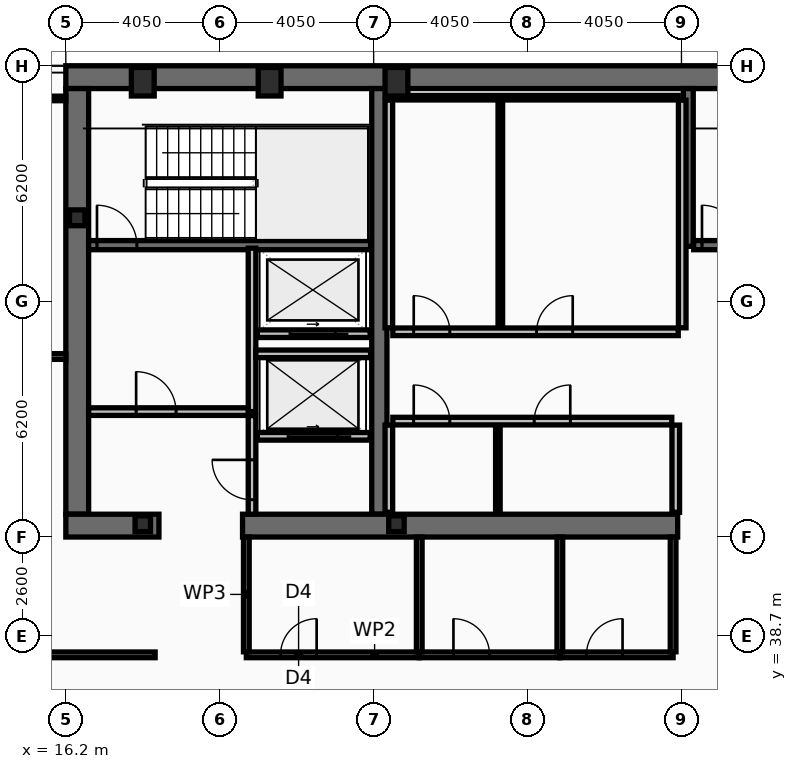
"""IFC4 building model, lengths in metres.
Left out: names, types, materials, properties, quantities, classifications, styles, units other than length and angle.
Written with IfcOpenShell. Run it as: python <this file> out.ifc"""

import sys

from ifc_helpers import new_model, si_unit, direction, frame, frame_2d, origin, origin_2d, place, context, subcontext, project, spatial, rectangle, hollow_rectangle, i_section, extrude, element, fill, save


model = new_model("IFC4")
c1 = context("Model", 3, precision=1e-05, world=origin(), true_north=direction((0.0, 1.0)))
c2 = subcontext(c1, "Body", "Model", "MODEL_VIEW")
j1 = project(units=[si_unit("LENGTHUNIT", "METRE"), si_unit("PLANEANGLEUNIT", "RADIAN")], contexts=[c1])
p1 = place(None, origin())
s1 = spatial("IfcSite", under=j1, at=p1, CompositionType="ELEMENT")
p2 = place(p1, origin())
s2 = spatial("IfcBuilding", under=s1, at=p2, CompositionType="ELEMENT")
p3 = place(p2, frame((0.0, 0.0, 217.4)))
s3 = spatial("IfcBuildingStorey", under=s2, at=p3, CompositionType="ELEMENT", Elevation=217.4)
p4 = place(p3, frame((16.2, 53.4, 0.0), z_axis=(0.0, 0.0, 1.0), x_axis=(1.0, 0.0, 0.0)))
e1 = element("IfcWall", 1, at=p4, inside=s3, PredefinedType="SHEAR", context=c2, shape_type="SweptSolid", body=[
    extrude(rectangle(XDim=40.5, YDim=0.6, at=frame_2d((20.25, 0.0))), origin(), (0.0, 0.0, 1.0), 3.44),
])
p5 = place(p3, frame((16.5, 41.9, 0.0), z_axis=(0.0, 0.0, 1.0), x_axis=(0.0, 1.0, 0.0)))
e2 = element("IfcWall", 2, at=p5, inside=s3, PredefinedType="SHEAR", context=c2, shape_type="SweptSolid", body=[
    extrude(rectangle(XDim=11.2, YDim=0.6, at=frame_2d((5.6, 0.0))), origin(), (0.0, 0.0, 1.0), 3.44),
])
p6 = place(p3, frame((24.45, 41.9, 0.0), z_axis=(0.0, 0.0, 1.0), x_axis=(0.0, 1.0, 0.0)))
e3 = element("IfcWall", 3, at=p6, inside=s3, PredefinedType="SHEAR", context=c2, shape_type="SweptSolid", body=[
    extrude(rectangle(XDim=11.2, YDim=0.4, at=frame_2d((5.6, 0.0))), origin(), (0.0, 0.0, 1.0), 3.44),
])
p7 = place(p3, frame((18.65, 41.6, 0.0), z_axis=(0.0, 0.0, 1.0), x_axis=(-1.0, 0.0, 0.0)))
e4 = element("IfcWall", 4, at=p7, inside=s3, PredefinedType="SHEAR", context=c2, shape_type="SweptSolid", body=[
    extrude(rectangle(XDim=2.45, YDim=0.6, at=frame_2d((1.225, 0.0))), origin(), (0.0, 0.0, 1.0), 3.44),
])
p8 = place(p3, frame((32.3, 41.6, 0.0), z_axis=(0.0, 0.0, 1.0), x_axis=(-1.0, 0.0, 0.0)))
e5 = element("IfcWall", 5, at=p8, inside=s3, PredefinedType="SHEAR", context=c2, shape_type="SweptSolid", body=[
    extrude(rectangle(XDim=11.45, YDim=0.6, at=frame_2d((5.725, 0.0))), origin(), (0.0, 0.0, 1.0), 3.44),
])
p9 = place(p3, frame((32.58, 48.95, 0.0), z_axis=(0.0, 0.0, 1.0), x_axis=(0.0, 1.0, 0.0)))
e6 = element("IfcWall", 6, at=p9, inside=s3, PredefinedType="SHEAR", context=c2, shape_type="SweptSolid", body=[
    extrude(rectangle(XDim=4.15, YDim=0.26, at=frame_2d((2.075, 0.0))), origin(), (0.0, 0.0, 1.0), 3.44),
])
p10 = place(p3, frame((16.8, 48.98, 0.0), z_axis=(0.0, 0.0, 1.0), x_axis=(1.0, 0.0, 0.0)))
e7 = element("IfcWall", 7, at=p10, inside=s3, PredefinedType="SHEAR", context=c2, shape_type="SweptSolid", body=[
    extrude(rectangle(XDim=7.42, YDim=0.24, at=frame_2d((3.71, 0.0))), origin(), (0.0, 0.0, 1.0), 3.44),
])
p11 = place(p10, frame((0.22, 0.0, 0.0)))
e8 = element("IfcOpeningElement", 8, at=p11, cuts=e7, PredefinedType="OPENING", context=c2, shape_type="SweptSolid", body=[
    extrude(rectangle(XDim=1.05, YDim=2.15, at=frame_2d((0.525, 1.075))), frame((0.0, 0.13, 0.0), z_axis=(0.0, -1.0, 0.0), x_axis=(1.0, 0.0, 0.0)), (0.0, 0.0, 1.0), 0.26),
])
p12 = place(p3, frame((32.72, 48.98, 0.0), z_axis=(0.0, 0.0, 1.0), x_axis=(1.0, 0.0, 0.0)))
e9 = element("IfcWall", 9, at=p12, inside=s3, PredefinedType="SHEAR", context=c2, shape_type="SweptSolid", body=[
    extrude(rectangle(XDim=7.56, YDim=0.24, at=frame_2d((3.78, 0.0))), origin(), (0.0, 0.0, 1.0), 3.44),
])
p13 = place(p12, frame((0.22, 0.0, 0.0)))
e10 = element("IfcOpeningElement", 10, at=p13, cuts=e9, PredefinedType="OPENING", context=c2, shape_type="SweptSolid", body=[
    extrude(rectangle(XDim=1.05, YDim=2.15, at=frame_2d((0.525, 1.075))), frame((0.0, 0.13, 0.0), z_axis=(0.0, -1.0, 0.0), x_axis=(1.0, 0.0, 0.0)), (0.0, 0.0, 1.0), 0.26),
])
for number, where, z_axis, x_axis in (
    (11, (18.225, 53.28, 0.0), (0.0, 0.0, 1.0), (1.0, 0.0, 0.0)),
    (12, (21.562, 53.28, 0.0), (0.0, 0.0, 1.0), (1.0, 0.0, 0.0)),
    (13, (24.9, 53.28, 0.0), (0.0, 0.0, 1.0), (1.0, 0.0, 0.0)),
):
    element("IfcColumn", number, at=place(p3, frame(where, z_axis=z_axis, x_axis=x_axis)), inside=s3, PredefinedType="COLUMN", context=c2, shape_type="SweptSolid", body=[
        extrude(hollow_rectangle(XDim=0.6, YDim=0.75, WallThickness=0.045, at=origin_2d()), origin(), (0.0, 0.0, 1.0), 3.6),
    ])
for number, where, z_axis, x_axis in (
    (14, (16.5, 49.7, 0.0), (0.0, 0.0, 1.0), (1.0, 0.0, 0.0)),
    (15, (18.225, 41.65, 0.0), (0.0, 0.0, 1.0), (1.0, 0.0, 0.0)),
    (16, (24.9, 41.65, 0.0), (0.0, 0.0, 1.0), (1.0, 0.0, 0.0)),
):
    element("IfcColumn", number, at=place(p3, frame(where, z_axis=z_axis, x_axis=x_axis)), inside=s3, PredefinedType="COLUMN", context=c2, shape_type="SweptSolid", body=[
        extrude(i_section(OverallWidth=0.406, OverallDepth=0.416, WebThickness=0.03, FlangeThickness=0.048, at=origin_2d()), origin(), (0.0, 0.0, 1.0), 3.6),
    ])
p14 = place(p3, frame((24.21, 43.95, 0.0), z_axis=(0.0, 0.0, 1.0), x_axis=(-1.0, 0.0, 0.0)))
e17 = element("IfcWall", 17, at=p14, inside=s3, PredefinedType="PARTITIONING", context=c2, shape_type="SweptSolid", body=[
    extrude(rectangle(XDim=2.97, YDim=0.2, at=frame_2d((1.485, 0.0))), origin(), (0.0, 0.0, 1.0), 3.44),
])
p15 = place(p14, frame((0.86, 0.0, 0.0)))
e18 = element("IfcOpeningElement", 18, at=p15, cuts=e17, PredefinedType="OPENING", context=c2, shape_type="SweptSolid", body=[
    extrude(rectangle(XDim=1.3, YDim=2.18, at=frame_2d((0.65, 1.09))), frame((0.0, 0.11, 0.0), z_axis=(0.0, -1.0, 0.0), x_axis=(1.0, 0.0, 0.0)), (0.0, 0.0, 1.0), 0.22),
])
p16 = place(p3, frame((24.21, 46.65, 0.0), z_axis=(0.0, 0.0, 1.0), x_axis=(-1.0, 0.0, 0.0)))
e19 = element("IfcWall", 19, at=p16, inside=s3, PredefinedType="PARTITIONING", context=c2, shape_type="SweptSolid", body=[
    extrude(rectangle(XDim=2.97, YDim=0.2, at=frame_2d((1.485, 0.0))), origin(), (0.0, 0.0, 1.0), 3.44),
])
p17 = place(p16, frame((0.91, 0.0, 0.0)))
e20 = element("IfcOpeningElement", 20, at=p17, cuts=e19, PredefinedType="OPENING", context=c2, shape_type="SweptSolid", body=[
    extrude(rectangle(XDim=1.2, YDim=2.18, at=frame_2d((0.6, 1.09))), frame((0.0, 0.11, 0.0), z_axis=(0.0, -1.0, 0.0), x_axis=(1.0, 0.0, 0.0)), (0.0, 0.0, 1.0), 0.22),
])
p18 = place(p3, frame((21.1, 44.6, 0.0), z_axis=(0.0, 0.0, 1.0), x_axis=(0.0, 1.0, 0.0)))
e21 = element("IfcWall", 21, at=p18, inside=s3, PredefinedType="PARTITIONING", context=c2, shape_type="SweptSolid", body=[
    extrude(rectangle(XDim=4.3, YDim=0.2, at=frame_2d((2.15, 0.0))), origin(), (0.0, 0.0, 1.0), 3.44),
])
p19 = place(p3, frame((16.8, 44.6, 0.0), z_axis=(0.0, 0.0, 1.0), x_axis=(1.0, 0.0, 0.0)))
e22 = element("IfcWall", 22, at=p19, inside=s3, PredefinedType="PARTITIONING", context=c2, shape_type="SweptSolid", body=[
    extrude(rectangle(XDim=4.2, YDim=0.2, at=frame_2d((2.1, 0.0))), origin(), (0.0, 0.0, 1.0), 3.44),
])
p20 = place(p19, frame((1.25, 0.0, 0.0)))
e23 = element("IfcOpeningElement", 23, at=p20, cuts=e22, PredefinedType="OPENING", context=c2, shape_type="SweptSolid", body=[
    extrude(rectangle(XDim=1.05, YDim=2.15, at=frame_2d((0.525, 1.075))), frame((0.0, 0.11, 0.0), z_axis=(0.0, -1.0, 0.0), x_axis=(1.0, 0.0, 0.0)), (0.0, 0.0, 1.0), 0.22),
])
p21 = place(p3, frame((21.2, 46.12, 0.0), z_axis=(0.0, 0.0, 1.0), x_axis=(1.0, 0.0, 0.0)))
e24 = element("IfcWall", 24, at=p21, inside=s3, PredefinedType="PARTITIONING", context=c2, shape_type="SweptSolid", body=[
    extrude(rectangle(XDim=3.02, YDim=0.2, at=frame_2d((1.51, 0.0))), origin(), (0.0, 0.0, 1.0), 3.44),
])
p22 = place(p3, frame((21.1, 41.9, 0.0), z_axis=(0.0, 0.0, 1.0), x_axis=(0.0, 1.0, 0.0)))
e25 = element("IfcWall", 25, at=p22, inside=s3, PredefinedType="PARTITIONING", context=c2, shape_type="SweptSolid", body=[
    extrude(rectangle(XDim=2.595, YDim=0.2, at=frame_2d((1.298, 0.0))), origin(), (0.0, 0.0, 1.0), 3.44),
])
p23 = place(p22, frame((0.38, 0.0, 0.0)))
e26 = element("IfcOpeningElement", 26, at=p23, cuts=e25, PredefinedType="OPENING", context=c2, shape_type="SweptSolid", body=[
    extrude(rectangle(XDim=1.05, YDim=2.15, at=frame_2d((0.525, 1.075))), frame((0.0, 0.11, 0.0), z_axis=(0.0, -1.0, 0.0), x_axis=(1.0, 0.0, 0.0)), (0.0, 0.0, 1.0), 0.22),
])
for number, where, z_axis, x_axis in (
    (27, (24.7, 46.805, 0.0), (0.0, 0.0, 1.0), (0.0, 1.0, 0.0)),
    (28, (32.42, 46.805, 0.0), (0.0, 0.0, 1.0), (0.0, 1.0, 0.0)),
):
    element("IfcWall", number, at=place(p3, frame(where, z_axis=z_axis, x_axis=x_axis)), inside=s3, PredefinedType="PARTITIONING", context=c2, shape_type="SweptSolid", body=[
        extrude(rectangle(XDim=5.99, YDim=0.2, at=frame_2d((2.995, 0.0))), origin(), (0.0, 0.0, 1.0), 3.44),
    ])
p24 = place(p3, frame((24.805, 52.86, 0.0), z_axis=(0.0, 0.0, 1.0), x_axis=(1.0, 0.0, 0.0)))
e29 = element("IfcWall", 29, at=p24, inside=s3, PredefinedType="PARTITIONING", context=c2, shape_type="SweptSolid", body=[
    extrude(rectangle(XDim=7.51, YDim=0.12, at=frame_2d((3.755, 0.0))), origin(), (0.0, 0.0, 1.0), 3.44),
])
p25 = place(p3, frame((27.634, 46.805, 0.0), z_axis=(0.0, 0.0, 1.0), x_axis=(0.0, 1.0, 0.0)))
e30 = element("IfcWall", 30, at=p25, inside=s3, PredefinedType="PARTITIONING", context=c2, shape_type="SweptSolid", body=[
    extrude(rectangle(XDim=5.99, YDim=0.12, at=frame_2d((2.995, 0.0))), origin(), (0.0, 0.0, 1.0), 3.44),
])
p26 = place(p3, frame((24.805, 46.7, 0.0), z_axis=(0.0, 0.0, 1.0), x_axis=(1.0, 0.0, 0.0)))
e31 = element("IfcWall", 31, at=p26, inside=s3, PredefinedType="PARTITIONING", context=c2, shape_type="SweptSolid", body=[
    extrude(rectangle(XDim=7.51, YDim=0.2, at=frame_2d((3.755, 0.0))), origin(), (0.0, 0.0, 1.0), 3.44),
])
p27 = place(p26, frame((0.55, 0.0, 0.0)))
e32 = element("IfcOpeningElement", 32, at=p27, cuts=e31, PredefinedType="OPENING", context=c2, shape_type="SweptSolid", body=[
    extrude(rectangle(XDim=0.95, YDim=2.1, at=frame_2d((0.475, 1.05))), frame((0.0, 0.11, 0.0), z_axis=(0.0, -1.0, 0.0), x_axis=(1.0, 0.0, 0.0)), (0.0, 0.0, 1.0), 0.22),
])
p28 = place(p26, frame((3.784, 0.0, 0.0)))
e33 = element("IfcOpeningElement", 33, at=p28, cuts=e31, PredefinedType="OPENING", context=c2, shape_type="SweptSolid", body=[
    extrude(rectangle(XDim=0.95, YDim=2.1, at=frame_2d((0.475, 1.05))), frame((0.0, 0.11, 0.0), z_axis=(0.0, -1.0, 0.0), x_axis=(1.0, 0.0, 0.0)), (0.0, 0.0, 1.0), 0.22),
])
for number, where, z_axis, x_axis in (
    (34, (24.7, 41.95, 0.0), (0.0, 0.0, 1.0), (0.0, 1.0, 0.0)),
    (35, (32.25, 41.95, 0.0), (0.0, 0.0, 1.0), (0.0, 1.0, 0.0)),
):
    element("IfcWall", number, at=place(p3, frame(where, z_axis=z_axis, x_axis=x_axis)), inside=s3, PredefinedType="PARTITIONING", context=c2, shape_type="SweptSolid", body=[
        extrude(rectangle(XDim=2.295, YDim=0.2, at=frame_2d((1.147, 0.0))), origin(), (0.0, 0.0, 1.0), 3.44),
    ])
p29 = place(p3, frame((27.569, 41.95, 0.0), z_axis=(0.0, 0.0, 1.0), x_axis=(0.0, 1.0, 0.0)))
e36 = element("IfcWall", 36, at=p29, inside=s3, PredefinedType="PARTITIONING", context=c2, shape_type="SweptSolid", body=[
    extrude(rectangle(XDim=2.295, YDim=0.12, at=frame_2d((1.147, 0.0))), origin(), (0.0, 0.0, 1.0), 3.44),
])
p30 = place(p3, frame((24.805, 44.35, 0.0), z_axis=(0.0, 0.0, 1.0), x_axis=(1.0, 0.0, 0.0)))
e37 = element("IfcWall", 37, at=p30, inside=s3, PredefinedType="PARTITIONING", context=c2, shape_type="SweptSolid", body=[
    extrude(rectangle(XDim=7.34, YDim=0.2, at=frame_2d((3.67, 0.0))), origin(), (0.0, 0.0, 1.0), 3.44),
])
p31 = place(p30, frame((0.55, 0.0, 0.0)))
e38 = element("IfcOpeningElement", 38, at=p31, cuts=e37, PredefinedType="OPENING", context=c2, shape_type="SweptSolid", body=[
    extrude(rectangle(XDim=0.95, YDim=2.1, at=frame_2d((0.475, 1.05))), frame((0.0, 0.11, 0.0), z_axis=(0.0, -1.0, 0.0), x_axis=(1.0, 0.0, 0.0)), (0.0, 0.0, 1.0), 0.22),
])
p32 = place(p30, frame((3.719, 0.0, 0.0)))
e39 = element("IfcOpeningElement", 39, at=p32, cuts=e37, PredefinedType="OPENING", context=c2, shape_type="SweptSolid", body=[
    extrude(rectangle(XDim=0.95, YDim=2.1, at=frame_2d((0.475, 1.05))), frame((0.0, 0.11, 0.0), z_axis=(0.0, -1.0, 0.0), x_axis=(1.0, 0.0, 0.0)), (0.0, 0.0, 1.0), 0.22),
])
p33 = place(p3, frame((20.95, 38.2, 0.0), z_axis=(0.0, 0.0, 1.0), x_axis=(1.0, 0.0, 0.0)))
e40 = element("IfcWall", 40, at=p33, inside=s3, PredefinedType="PARTITIONING", context=c2, shape_type="SweptSolid", body=[
    extrude(rectangle(XDim=4.55, YDim=0.15, at=frame_2d((2.275, 0.0))), origin(), (0.0, 0.0, 1.0), 2.78),
])
p34 = place(p33, frame((0.9, 0.0, 0.0)))
e41 = element("IfcOpeningElement", 41, at=p34, cuts=e40, PredefinedType="OPENING", context=c2, shape_type="SweptSolid", body=[
    extrude(rectangle(XDim=0.95, YDim=2.05, at=frame_2d((0.475, 1.025))), frame((0.0, 0.085, 0.0), z_axis=(0.0, -1.0, 0.0), x_axis=(1.0, 0.0, 0.0)), (0.0, 0.0, 1.0), 0.17),
])
p35 = place(p3, frame((25.5, 38.2, 0.0), z_axis=(0.0, 0.0, 1.0), x_axis=(1.0, 0.0, 0.0)))
e42 = element("IfcWall", 42, at=p35, inside=s3, PredefinedType="PARTITIONING", context=c2, shape_type="SweptSolid", body=[
    extrude(rectangle(XDim=3.7, YDim=0.15, at=frame_2d((1.85, 0.0))), origin(), (0.0, 0.0, 1.0), 3.44),
])
p36 = place(p35, frame((0.9, 0.0, 0.0)))
e43 = element("IfcOpeningElement", 43, at=p36, cuts=e42, PredefinedType="OPENING", context=c2, shape_type="SweptSolid", body=[
    extrude(rectangle(XDim=0.95, YDim=2.05, at=frame_2d((0.475, 1.025))), frame((0.0, 0.085, 0.0), z_axis=(0.0, -1.0, 0.0), x_axis=(1.0, 0.0, 0.0)), (0.0, 0.0, 1.0), 0.17),
])
p37 = place(p3, frame((29.2, 38.2, 0.0), z_axis=(0.0, 0.0, 1.0), x_axis=(1.0, 0.0, 0.0)))
e44 = element("IfcWall", 44, at=p37, inside=s3, PredefinedType="PARTITIONING", context=c2, shape_type="SweptSolid", body=[
    extrude(rectangle(XDim=2.98, YDim=0.15, at=frame_2d((1.49, 0.0))), origin(), (0.0, 0.0, 1.0), 2.78),
])
p38 = place(p37, frame((0.7, 0.0, 0.0)))
e45 = element("IfcOpeningElement", 45, at=p38, cuts=e44, PredefinedType="OPENING", context=c2, shape_type="SweptSolid", body=[
    extrude(rectangle(XDim=0.95, YDim=2.05, at=frame_2d((0.475, 1.025))), frame((0.0, 0.085, 0.0), z_axis=(0.0, -1.0, 0.0), x_axis=(1.0, 0.0, 0.0)), (0.0, 0.0, 1.0), 0.17),
])
for number, where, z_axis, x_axis in (
    (46, (20.95, 38.28, 0.0), (0.0, 0.0, 1.0), (0.0, 1.0, 0.0)),
    (47, (25.5, 38.28, 0.0), (0.0, 0.0, 1.0), (0.0, 1.0, 0.0)),
    (48, (29.2, 38.28, 0.0), (0.0, 0.0, 1.0), (0.0, 1.0, 0.0)),
    (49, (32.18, 38.28, 0.0), (0.0, 0.0, 1.0), (0.0, 1.0, 0.0)),
):
    element("IfcWall", number, at=place(p3, frame(where, z_axis=z_axis, x_axis=x_axis)), inside=s3, PredefinedType="PARTITIONING", context=c2, shape_type="SweptSolid", body=[
        extrude(rectangle(XDim=3.02, YDim=0.15, at=frame_2d((1.51, 0.0))), origin(), (0.0, 0.0, 1.0), 3.44),
    ])
p39 = place(p3, frame((8.03, 38.2, 0.0), z_axis=(0.0, 0.0, 1.0), x_axis=(1.0, 0.0, 0.0)))
e50 = element("IfcWall", 50, at=p39, inside=s3, PredefinedType="PARTITIONING", context=c2, shape_type="SweptSolid", body=[
    extrude(rectangle(XDim=10.52, YDim=0.15, at=frame_2d((5.26, 0.0))), origin(), (0.0, 0.0, 1.0), 2.78),
])
p40 = place(p39, frame((6.32, 0.0, 0.0)))
e51 = element("IfcOpeningElement", 51, at=p40, cuts=e50, PredefinedType="OPENING", context=c2, shape_type="SweptSolid", body=[
    extrude(rectangle(XDim=0.95, YDim=2.05, at=frame_2d((0.475, 1.025))), frame((0.0, 0.085, 0.0), z_axis=(0.0, -1.0, 0.0), x_axis=(1.0, 0.0, 0.0)), (0.0, 0.0, 1.0), 0.17),
])
p41 = place(p3, frame((8.095, 46.05, 0.0), z_axis=(0.0, 0.0, 1.0), x_axis=(1.0, 0.0, 0.0)))
e52 = element("IfcWall", 52, at=p41, inside=s3, PredefinedType="PARTITIONING", context=c2, shape_type="SweptSolid", body=[
    extrude(rectangle(XDim=8.105, YDim=0.15, at=frame_2d((4.052, 0.0))), origin(), (0.0, 0.0, 1.0), 2.83),
])
p42 = place(p41, frame((6.32, 0.0, 0.0)))
e53 = element("IfcOpeningElement", 53, at=p42, cuts=e52, PredefinedType="OPENING", context=c2, shape_type="SweptSolid", body=[
    extrude(rectangle(XDim=0.9, YDim=2.05, at=frame_2d((0.45, 1.025))), frame((0.0, 0.085, 0.0), z_axis=(0.0, -1.0, 0.0), x_axis=(1.0, 0.0, 0.0)), (0.0, 0.0, 1.0), 0.17),
])
p43 = place(p3, frame((8.095, 52.84, 0.0), z_axis=(0.0, 0.0, 1.0), x_axis=(1.0, 0.0, 0.0)))
e54 = element("IfcWall", 54, at=p43, inside=s3, PredefinedType="PARTITIONING", context=c2, shape_type="SweptSolid", body=[
    extrude(rectangle(XDim=8.105, YDim=0.12, at=frame_2d((4.052, 0.0))), origin(), (0.0, 0.0, 1.0), 3.44),
])
p44 = place(p11, origin())
e55 = element("IfcDoor", 55, at=p44, inside=s3, OperationType="SINGLE_SWING_LEFT", PredefinedType="DOOR", context=c2, shape_type="SweptSolid", body=[
    extrude(rectangle(XDim=1.05, YDim=2.15, at=frame_2d((0.525, 1.075))), frame((0.0, 0.025, 0.0), z_axis=(0.0, -1.0, 0.0), x_axis=(1.0, 0.0, 0.0)), (0.0, 0.0, 1.0), 0.05),
])
fill(e8, e55)
p45 = place(p13, origin())
e56 = element("IfcDoor", 56, at=p45, inside=s3, OperationType="SINGLE_SWING_LEFT", PredefinedType="DOOR", context=c2, shape_type="SweptSolid", body=[
    extrude(rectangle(XDim=1.05, YDim=2.15, at=frame_2d((0.525, 1.075))), frame((0.0, 0.025, 0.0), z_axis=(0.0, -1.0, 0.0), x_axis=(1.0, 0.0, 0.0)), (0.0, 0.0, 1.0), 0.05),
])
fill(e10, e56)
p46 = place(p15, origin())
e57 = element("IfcDoor", 57, at=p46, inside=s3, OperationType="SLIDING_TO_LEFT", PredefinedType="DOOR", context=c2, shape_type="SweptSolid", body=[
    extrude(rectangle(XDim=1.3, YDim=2.18, at=frame_2d((0.65, 1.09))), frame((0.0, 0.025, 0.0), z_axis=(0.0, -1.0, 0.0), x_axis=(1.0, 0.0, 0.0)), (0.0, 0.0, 1.0), 0.05),
])
fill(e18, e57)
p47 = place(p17, origin())
e58 = element("IfcDoor", 58, at=p47, inside=s3, OperationType="SLIDING_TO_LEFT", PredefinedType="DOOR", context=c2, shape_type="SweptSolid", body=[
    extrude(rectangle(XDim=1.2, YDim=2.18, at=frame_2d((0.6, 1.09))), frame((0.0, 0.025, 0.0), z_axis=(0.0, -1.0, 0.0), x_axis=(1.0, 0.0, 0.0)), (0.0, 0.0, 1.0), 0.05),
])
fill(e20, e58)
p48 = place(p20, origin())
e59 = element("IfcDoor", 59, at=p48, inside=s3, OperationType="SINGLE_SWING_LEFT", PredefinedType="DOOR", context=c2, shape_type="SweptSolid", body=[
    extrude(rectangle(XDim=1.05, YDim=2.15, at=frame_2d((0.525, 1.075))), frame((0.0, 0.025, 0.0), z_axis=(0.0, -1.0, 0.0), x_axis=(1.0, 0.0, 0.0)), (0.0, 0.0, 1.0), 0.05),
])
fill(e23, e59)
p49 = place(p23, origin())
e60 = element("IfcDoor", 60, at=p49, inside=s3, OperationType="SINGLE_SWING_RIGHT", PredefinedType="DOOR", context=c2, shape_type="SweptSolid", body=[
    extrude(rectangle(XDim=1.05, YDim=2.15, at=frame_2d((0.525, 1.075))), frame((0.0, 0.025, 0.0), z_axis=(0.0, -1.0, 0.0), x_axis=(1.0, 0.0, 0.0)), (0.0, 0.0, 1.0), 0.05),
])
fill(e26, e60)
p50 = place(p27, origin())
e61 = element("IfcDoor", 61, at=p50, inside=s3, OperationType="SINGLE_SWING_LEFT", PredefinedType="DOOR", context=c2, shape_type="SweptSolid", body=[
    extrude(rectangle(XDim=0.95, YDim=2.1, at=frame_2d((0.475, 1.05))), frame((0.0, 0.025, 0.0), z_axis=(0.0, -1.0, 0.0), x_axis=(1.0, 0.0, 0.0)), (0.0, 0.0, 1.0), 0.05),
])
fill(e32, e61)
p51 = place(p28, origin())
e62 = element("IfcDoor", 62, at=p51, inside=s3, OperationType="SINGLE_SWING_RIGHT", PredefinedType="DOOR", context=c2, shape_type="SweptSolid", body=[
    extrude(rectangle(XDim=0.95, YDim=2.1, at=frame_2d((0.475, 1.05))), frame((0.0, 0.025, 0.0), z_axis=(0.0, -1.0, 0.0), x_axis=(1.0, 0.0, 0.0)), (0.0, 0.0, 1.0), 0.05),
])
fill(e33, e62)
p52 = place(p31, origin())
e63 = element("IfcDoor", 63, at=p52, inside=s3, OperationType="SINGLE_SWING_LEFT", PredefinedType="DOOR", context=c2, shape_type="SweptSolid", body=[
    extrude(rectangle(XDim=0.95, YDim=2.1, at=frame_2d((0.475, 1.05))), frame((0.0, 0.025, 0.0), z_axis=(0.0, -1.0, 0.0), x_axis=(1.0, 0.0, 0.0)), (0.0, 0.0, 1.0), 0.05),
])
fill(e38, e63)
p53 = place(p32, origin())
e64 = element("IfcDoor", 64, at=p53, inside=s3, OperationType="SINGLE_SWING_RIGHT", PredefinedType="DOOR", context=c2, shape_type="SweptSolid", body=[
    extrude(rectangle(XDim=0.95, YDim=2.1, at=frame_2d((0.475, 1.05))), frame((0.0, 0.025, 0.0), z_axis=(0.0, -1.0, 0.0), x_axis=(1.0, 0.0, 0.0)), (0.0, 0.0, 1.0), 0.05),
])
fill(e39, e64)
p54 = place(p34, origin())
e65 = element("IfcDoor", 65, at=p54, inside=s3, OperationType="SINGLE_SWING_RIGHT", PredefinedType="DOOR", context=c2, shape_type="SweptSolid", body=[
    extrude(rectangle(XDim=0.95, YDim=2.05, at=frame_2d((0.475, 1.025))), frame((0.0, 0.025, 0.0), z_axis=(0.0, -1.0, 0.0), x_axis=(1.0, 0.0, 0.0)), (0.0, 0.0, 1.0), 0.05),
])
fill(e41, e65)
p55 = place(p36, origin())
e66 = element("IfcDoor", 66, at=p55, inside=s3, OperationType="SINGLE_SWING_LEFT", PredefinedType="DOOR", context=c2, shape_type="SweptSolid", body=[
    extrude(rectangle(XDim=0.95, YDim=2.05, at=frame_2d((0.475, 1.025))), frame((0.0, 0.025, 0.0), z_axis=(0.0, -1.0, 0.0), x_axis=(1.0, 0.0, 0.0)), (0.0, 0.0, 1.0), 0.05),
])
fill(e43, e66)
p56 = place(p38, origin())
e67 = element("IfcDoor", 67, at=p56, inside=s3, OperationType="SINGLE_SWING_RIGHT", PredefinedType="DOOR", context=c2, shape_type="SweptSolid", body=[
    extrude(rectangle(XDim=0.95, YDim=2.05, at=frame_2d((0.475, 1.025))), frame((0.0, 0.025, 0.0), z_axis=(0.0, -1.0, 0.0), x_axis=(1.0, 0.0, 0.0)), (0.0, 0.0, 1.0), 0.05),
])
fill(e45, e67)
save(model, sys.argv[1])
